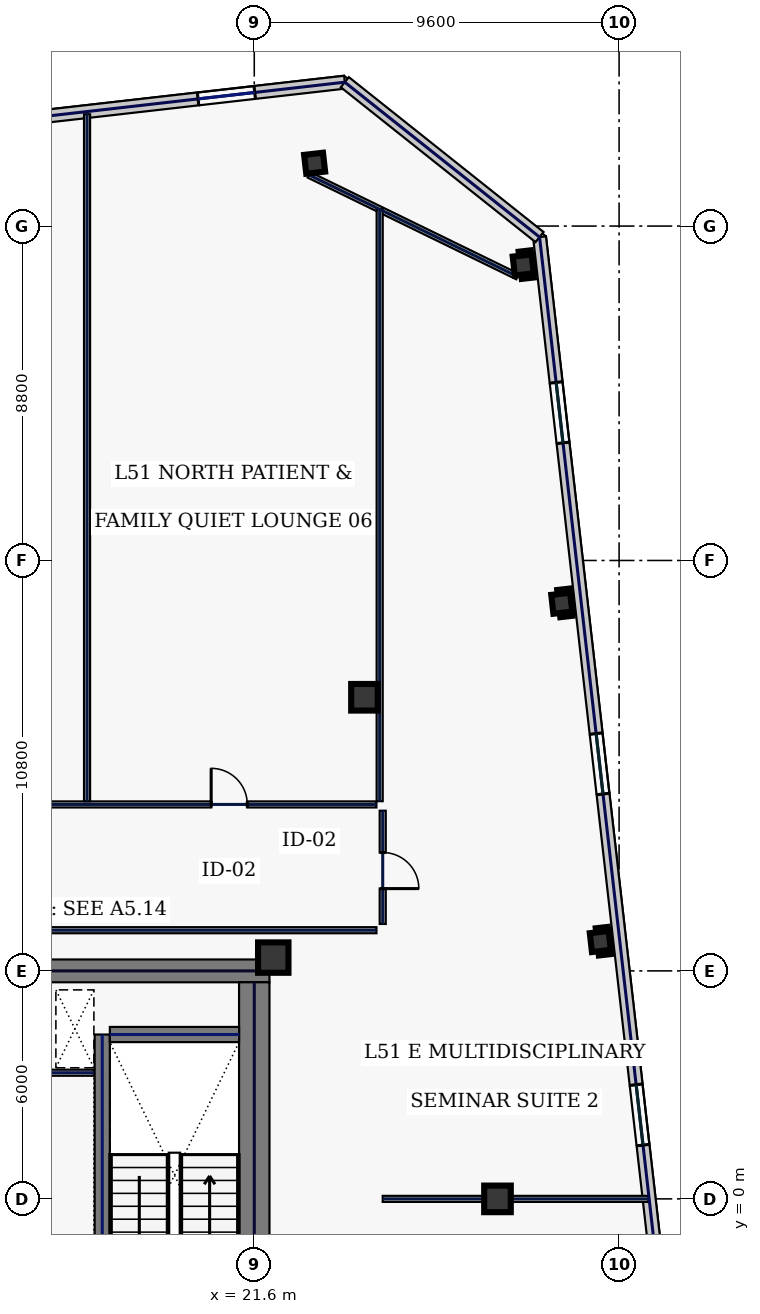
"""IFC4 building model, lengths in metres.
Left out: names, types, materials, properties, quantities, classifications, styles, units other than length and angle.
Written with IfcOpenShell. Run it as: python <this file> out.ifc"""

import sys

from ifc_helpers import new_model, si_unit, direction, frame, frame_2d, origin, origin_2d, place, context, subcontext, project, spatial, rectangle, hollow_rectangle, extrude, element, fill, save


model = new_model("IFC4")
c1 = context("Model", 3, precision=1e-05, world=origin(), true_north=direction((0.0, 1.0)))
c2 = subcontext(c1, "Body", "Model", "MODEL_VIEW")
j1 = project(units=[si_unit("LENGTHUNIT", "METRE"), si_unit("PLANEANGLEUNIT", "RADIAN")], contexts=[c1])
p1 = place(None, origin())
s1 = spatial("IfcSite", under=j1, at=p1, CompositionType="ELEMENT")
p2 = place(p1, origin())
s2 = spatial("IfcBuilding", under=s1, at=p2, CompositionType="ELEMENT")
p3 = place(p2, frame((0.0, 0.0, 222.2)))
s3 = spatial("IfcBuildingStorey", under=s2, at=p3, CompositionType="ELEMENT", Elevation=222.2)
p4 = place(p3, frame((10.5, 6.0, 0.0), z_axis=(0.0, 0.0, 1.0), x_axis=(1.0, 0.0, 0.0)))
e1 = element("IfcWall", 1, at=p4, inside=s3, PredefinedType="SHEAR", context=c2, shape_type="SweptSolid", body=[
    extrude(rectangle(XDim=11.5, YDim=0.6, at=frame_2d((5.75, 0.0))), origin(), (0.0, 0.0, 1.0), 3.74),
])
p5 = place(p3, frame((21.6, -5.7, 0.0), z_axis=(0.0, 0.0, 1.0), x_axis=(0.0, 1.0, 0.0)))
e2 = element("IfcWall", 2, at=p5, inside=s3, PredefinedType="SHEAR", context=c2, shape_type="SweptSolid", body=[
    extrude(rectangle(XDim=11.4, YDim=0.8, at=frame_2d((5.7, 0.0))), origin(), (0.0, 0.0, 1.0), 3.74),
])
p6 = place(p3, frame((17.6, -4.325, 0.0), z_axis=(0.0, 0.0, 1.0), x_axis=(0.0, 1.0, 0.0)))
e3 = element("IfcWall", 3, at=p6, inside=s3, PredefinedType="SHEAR", context=c2, shape_type="SweptSolid", body=[
    extrude(rectangle(XDim=8.65, YDim=0.4, at=frame_2d((4.325, 0.0))), origin(), (0.0, 0.0, 1.0), 3.74),
])
p7 = place(p6, frame((0.25, 0.0, 0.0)))
e4 = element("IfcOpeningElement", 4, at=p7, cuts=e3, PredefinedType="OPENING", context=c2, shape_type="SweptSolid", body=[
    extrude(rectangle(XDim=1.1, YDim=2.2, at=frame_2d((0.55, 1.1))), frame((0.0, 0.21, 0.0), z_axis=(0.0, -1.0, 0.0), x_axis=(1.0, 0.0, 0.0)), (0.0, 0.0, 1.0), 0.42),
])
p8 = place(p3, frame((17.8, 4.325, 0.0), z_axis=(0.0, 0.0, 1.0), x_axis=(1.0, 0.0, 0.0)))
e5 = element("IfcWall", 5, at=p8, inside=s3, PredefinedType="SHEAR", context=c2, shape_type="SweptSolid", body=[
    extrude(rectangle(XDim=3.4, YDim=0.4, at=frame_2d((1.7, 0.0))), origin(), (0.0, 0.0, 1.0), 3.74),
])
p9 = place(p3, frame((22.1, 6.35, 0.0), z_axis=(0.0, 0.0, 1.0), x_axis=(1.0, 0.0, 0.0)))
e6 = element("IfcColumn", 6, at=p9, inside=s3, PredefinedType="COLUMN", context=c2, shape_type="SweptSolid", body=[
    extrude(hollow_rectangle(XDim=0.8, YDim=0.8, WallThickness=0.036, at=origin_2d()), origin(), (0.0, 0.0, 1.0), 3.74),
])
for number, where, z_axis, x_axis in (
    (7, (24.5, 13.2, 0.0), (0.0, 0.0, 1.0), (1.0, 0.0, 0.0)),
    (8, (28.0, 0.0, 0.0), (0.0, 0.0, 1.0), (1.0, 0.0, 0.0)),
):
    element("IfcColumn", number, at=place(p3, frame(where, z_axis=z_axis, x_axis=x_axis)), inside=s3, PredefinedType="COLUMN", context=c2, shape_type="SweptSolid", body=[
        extrude(hollow_rectangle(XDim=0.7, YDim=0.7, WallThickness=0.032, at=origin_2d()), origin(), (0.0, 0.0, 1.0), 3.74),
    ])
for number, where, z_axis, x_axis in (
    (9, (23.188, 27.253, 0.0), (0.0, 0.0, 1.0), (0.994, 0.113, 0.0)),
    (10, (30.706, 6.772, 0.0), (0.0, 0.0, 1.0), (0.994, 0.113, 0.0)),
    (11, (29.691, 15.674, 0.0), (0.0, 0.0, 1.0), (0.994, 0.113, 0.0)),
    (12, (28.677, 24.577, 0.0), (0.0, 0.0, 1.0), (0.994, 0.113, 0.0)),
):
    element("IfcColumn", number, at=place(p3, frame(where, z_axis=z_axis, x_axis=x_axis)), inside=s3, PredefinedType="COLUMN", context=c2, shape_type="SweptSolid", body=[
        extrude(hollow_rectangle(XDim=0.5, YDim=0.5, WallThickness=0.025, at=origin_2d()), origin(), (0.0, 0.0, 1.0), 3.74),
    ])
p10 = place(p3, frame((23.983, 29.386, 0.0), z_axis=(0.0, 0.0, 1.0), x_axis=(-0.993572271362, -0.113199565282, 0.0)))
e13 = element("IfcWall", 13, at=p10, inside=s3, PredefinedType="STANDARD", context=c2, shape_type="SweptSolid", body=[
    extrude(rectangle(XDim=18.651, YDim=0.34, at=frame_2d((9.326, 0.0))), origin(), (0.0, 0.0, 1.0), 3.74),
])
p11 = place(p10, frame((14.027, 0.0, 0.83)))
e14 = element("IfcOpeningElement", 14, at=p11, cuts=e13, PredefinedType="OPENING", context=c2, shape_type="SweptSolid", body=[
    extrude(rectangle(XDim=1.5, YDim=2.0, at=frame_2d((0.75, 1.0))), frame((0.0, 0.18, 0.0), z_axis=(0.0, -1.0, 0.0), x_axis=(1.0, 0.0, 0.0)), (0.0, 0.0, 1.0), 0.36),
])
p12 = place(p10, frame((2.386, 0.0, 0.83)))
e15 = element("IfcOpeningElement", 15, at=p12, cuts=e13, PredefinedType="OPENING", context=c2, shape_type="SweptSolid", body=[
    extrude(rectangle(XDim=1.5, YDim=2.0, at=frame_2d((0.75, 1.0))), frame((0.0, 0.18, 0.0), z_axis=(0.0, -1.0, 0.0), x_axis=(1.0, 0.0, 0.0)), (0.0, 0.0, 1.0), 0.36),
])
p13 = place(p3, frame((33.318, -11.651, 0.0), z_axis=(0.0, 0.0, 1.0), x_axis=(-0.11320360501, 0.9935718111, 0.0)))
e16 = element("IfcWall", 16, at=p13, inside=s3, PredefinedType="STANDARD", context=c2, shape_type="SweptSolid", body=[
    extrude(rectangle(XDim=37.2, YDim=0.34, at=frame_2d((18.6, 0.0))), origin(), (0.0, 0.0, 1.0), 3.74),
])
p14 = place(p13, frame((3.85, 0.0, 0.58)))
e17 = element("IfcOpeningElement", 17, at=p14, cuts=e16, PredefinedType="OPENING", context=c2, shape_type="SweptSolid", body=[
    extrude(rectangle(XDim=1.6, YDim=2.3, at=frame_2d((0.8, 1.15))), frame((0.0, 0.18, 0.0), z_axis=(0.0, -1.0, 0.0), x_axis=(1.0, 0.0, 0.0)), (0.0, 0.0, 1.0), 0.36),
])
p15 = place(p13, frame((13.15, 0.0, 0.58)))
e18 = element("IfcOpeningElement", 18, at=p15, cuts=e16, PredefinedType="OPENING", context=c2, shape_type="SweptSolid", body=[
    extrude(rectangle(XDim=1.6, YDim=2.3, at=frame_2d((0.8, 1.15))), frame((0.0, 0.18, 0.0), z_axis=(0.0, -1.0, 0.0), x_axis=(1.0, 0.0, 0.0)), (0.0, 0.0, 1.0), 0.36),
])
p16 = place(p13, frame((22.45, 0.0, 0.58)))
e19 = element("IfcOpeningElement", 19, at=p16, cuts=e16, PredefinedType="OPENING", context=c2, shape_type="SweptSolid", body=[
    extrude(rectangle(XDim=1.6, YDim=2.3, at=frame_2d((0.8, 1.15))), frame((0.0, 0.18, 0.0), z_axis=(0.0, -1.0, 0.0), x_axis=(1.0, 0.0, 0.0)), (0.0, 0.0, 1.0), 0.36),
])
p17 = place(p13, frame((31.75, 0.0, 0.58)))
e20 = element("IfcOpeningElement", 20, at=p17, cuts=e16, PredefinedType="OPENING", context=c2, shape_type="SweptSolid", body=[
    extrude(rectangle(XDim=1.6, YDim=2.3, at=frame_2d((0.8, 1.15))), frame((0.0, 0.18, 0.0), z_axis=(0.0, -1.0, 0.0), x_axis=(1.0, 0.0, 0.0)), (0.0, 0.0, 1.0), 0.36),
])
p18 = place(p3, frame((29.107, 25.31, 0.0), z_axis=(0.0, 0.0, 1.0), x_axis=(-0.78259733853, 0.62252823689, 0.0)))
e21 = element("IfcWall", 21, at=p18, inside=s3, PredefinedType="STANDARD", context=c2, shape_type="SweptSolid", body=[
    extrude(rectangle(XDim=6.548, YDim=0.34, at=frame_2d((3.274, 0.0))), origin(), (0.0, 0.0, 1.0), 3.74),
])
p19 = place(p3, frame((15.725, 3.32, 0.0), z_axis=(0.0, 0.0, 1.0), x_axis=(1.0, 0.0, 0.0)))
e22 = element("IfcWall", 22, at=p19, inside=s3, PredefinedType="PARTITIONING", context=c2, shape_type="SweptSolid", body=[
    extrude(rectangle(XDim=1.655, YDim=0.16, at=frame_2d((0.827, 0.0))), origin(), (0.0, 0.0, 1.0), 3.74),
])
p20 = place(p3, frame((28.528, 24.271, 0.0), z_axis=(0.0, 0.0, 1.0), x_axis=(-0.898820692789, 0.438316509173, 0.0)))
e23 = element("IfcWall", 23, at=p20, inside=s3, PredefinedType="PARTITIONING", context=c2, shape_type="SweptSolid", body=[
    extrude(rectangle(XDim=6.107, YDim=0.16, at=frame_2d((3.053, 0.0))), origin(), (0.0, 0.0, 1.0), 3.74),
])
p21 = place(p3, frame((-24.815, 10.38, 0.0), z_axis=(0.0, 0.0, 1.0), x_axis=(1.0, 0.0, 0.0)))
e24 = element("IfcWall", 24, at=p21, inside=s3, PredefinedType="PARTITIONING", context=c2, shape_type="SweptSolid", body=[
    extrude(rectangle(XDim=49.63, YDim=0.16, at=frame_2d((24.815, 0.0))), origin(), (0.0, 0.0, 1.0), 3.74),
])
p22 = place(p21, frame((2.044, 0.0, 0.0)))
e25 = element("IfcOpeningElement", 25, at=p22, cuts=e24, PredefinedType="OPENING", context=c2, shape_type="SweptSolid", body=[
    extrude(rectangle(XDim=0.95, YDim=2.2, at=frame_2d((0.475, 1.1))), frame((0.0, 0.09, 0.0), z_axis=(0.0, -1.0, 0.0), x_axis=(1.0, 0.0, 0.0)), (0.0, 0.0, 1.0), 0.18),
])
p23 = place(p21, frame((6.72, 0.0, 0.0)))
e26 = element("IfcOpeningElement", 26, at=p23, cuts=e24, PredefinedType="OPENING", context=c2, shape_type="SweptSolid", body=[
    extrude(rectangle(XDim=0.95, YDim=2.2, at=frame_2d((0.475, 1.1))), frame((0.0, 0.09, 0.0), z_axis=(0.0, -1.0, 0.0), x_axis=(1.0, 0.0, 0.0)), (0.0, 0.0, 1.0), 0.18),
])
p24 = place(p21, frame((12.13, 0.0, 0.0)))
e27 = element("IfcOpeningElement", 27, at=p24, cuts=e24, PredefinedType="OPENING", context=c2, shape_type="SweptSolid", body=[
    extrude(rectangle(XDim=0.95, YDim=2.2, at=frame_2d((0.475, 1.1))), frame((0.0, 0.09, 0.0), z_axis=(0.0, -1.0, 0.0), x_axis=(1.0, 0.0, 0.0)), (0.0, 0.0, 1.0), 0.18),
])
p25 = place(p21, frame((17.235, 0.0, 0.0)))
e28 = element("IfcOpeningElement", 28, at=p25, cuts=e24, PredefinedType="OPENING", context=c2, shape_type="SweptSolid", body=[
    extrude(rectangle(XDim=1.3, YDim=2.2, at=frame_2d((0.65, 1.1))), frame((0.0, 0.09, 0.0), z_axis=(0.0, -1.0, 0.0), x_axis=(1.0, 0.0, 0.0)), (0.0, 0.0, 1.0), 0.18),
])
p26 = place(p21, frame((22.89, 0.0, 0.0)))
e29 = element("IfcOpeningElement", 29, at=p26, cuts=e24, PredefinedType="OPENING", context=c2, shape_type="SweptSolid", body=[
    extrude(rectangle(XDim=1.3, YDim=2.2, at=frame_2d((0.65, 1.1))), frame((0.0, 0.09, 0.0), z_axis=(0.0, -1.0, 0.0), x_axis=(1.0, 0.0, 0.0)), (0.0, 0.0, 1.0), 0.18),
])
p27 = place(p21, frame((27.925, 0.0, 0.0)))
e30 = element("IfcOpeningElement", 30, at=p27, cuts=e24, PredefinedType="OPENING", context=c2, shape_type="SweptSolid", body=[
    extrude(rectangle(XDim=0.95, YDim=2.2, at=frame_2d((0.475, 1.1))), frame((0.0, 0.09, 0.0), z_axis=(0.0, -1.0, 0.0), x_axis=(1.0, 0.0, 0.0)), (0.0, 0.0, 1.0), 0.18),
])
p28 = place(p21, frame((34.445, 0.0, 0.0)))
e31 = element("IfcOpeningElement", 31, at=p28, cuts=e24, PredefinedType="OPENING", context=c2, shape_type="SweptSolid", body=[
    extrude(rectangle(XDim=0.95, YDim=2.2, at=frame_2d((0.475, 1.1))), frame((0.0, 0.09, 0.0), z_axis=(0.0, -1.0, 0.0), x_axis=(1.0, 0.0, 0.0)), (0.0, 0.0, 1.0), 0.18),
])
p29 = place(p21, frame((39.645, 0.0, 0.0)))
e32 = element("IfcOpeningElement", 32, at=p29, cuts=e24, PredefinedType="OPENING", context=c2, shape_type="SweptSolid", body=[
    extrude(rectangle(XDim=0.95, YDim=2.2, at=frame_2d((0.475, 1.1))), frame((0.0, 0.09, 0.0), z_axis=(0.0, -1.0, 0.0), x_axis=(1.0, 0.0, 0.0)), (0.0, 0.0, 1.0), 0.18),
])
p30 = place(p21, frame((45.281, 0.0, 0.0)))
e33 = element("IfcOpeningElement", 33, at=p30, cuts=e24, PredefinedType="OPENING", context=c2, shape_type="SweptSolid", body=[
    extrude(rectangle(XDim=0.95, YDim=2.2, at=frame_2d((0.475, 1.1))), frame((0.0, 0.09, 0.0), z_axis=(0.0, -1.0, 0.0), x_axis=(1.0, 0.0, 0.0)), (0.0, 0.0, 1.0), 0.18),
])
p31 = place(p3, frame((24.98, 10.215, 0.0), z_axis=(0.0, 0.0, 1.0), x_axis=(0.0, -1.0, 0.0)))
e34 = element("IfcWall", 34, at=p31, inside=s3, PredefinedType="PARTITIONING", context=c2, shape_type="SweptSolid", body=[
    extrude(rectangle(XDim=2.98, YDim=0.16, at=frame_2d((1.49, 0.0))), origin(), (0.0, 0.0, 1.0), 3.74),
])
p32 = place(p31, frame((1.1, 0.0, 0.0)))
e35 = element("IfcOpeningElement", 35, at=p32, cuts=e34, PredefinedType="OPENING", context=c2, shape_type="SweptSolid", body=[
    extrude(rectangle(XDim=0.95, YDim=2.2, at=frame_2d((0.475, 1.1))), frame((0.0, 0.09, 0.0), z_axis=(0.0, -1.0, 0.0), x_axis=(1.0, 0.0, 0.0)), (0.0, 0.0, 1.0), 0.18),
])
p33 = place(p3, frame((24.815, 7.07, 0.0), z_axis=(0.0, 0.0, 1.0), x_axis=(-1.0, 0.0, 0.0)))
e36 = element("IfcWall", 36, at=p33, inside=s3, PredefinedType="PARTITIONING", context=c2, shape_type="SweptSolid", body=[
    extrude(rectangle(XDim=14.1, YDim=0.16, at=frame_2d((7.05, 0.0))), origin(), (0.0, 0.0, 1.0), 3.74),
])
p34 = place(p3, frame((24.9, 10.465, 0.0), z_axis=(0.0, 0.0, 1.0), x_axis=(0.0, 1.0, 0.0)))
e37 = element("IfcWall", 37, at=p34, inside=s3, PredefinedType="PARTITIONING", context=c2, shape_type="SweptSolid", body=[
    extrude(rectangle(XDim=15.579, YDim=0.16, at=frame_2d((7.79, 0.0))), origin(), (0.0, 0.0, 1.0), 3.74),
])
p35 = place(p3, frame((17.2, 10.465, 0.0), z_axis=(0.0, 0.0, 1.0), x_axis=(0.0, 1.0, 0.0)))
e38 = element("IfcWall", 38, at=p35, inside=s3, PredefinedType="PARTITIONING", context=c2, shape_type="SweptSolid", body=[
    extrude(rectangle(XDim=18.078, YDim=0.16, at=frame_2d((9.039, 0.0))), origin(), (0.0, 0.0, 1.0), 3.74),
])
p36 = place(p3, frame((24.98, 0.0, 0.0), z_axis=(0.0, 0.0, 1.0), x_axis=(1.0, 0.0, 0.0)))
e39 = element("IfcWall", 39, at=p36, inside=s3, PredefinedType="PARTITIONING", context=c2, shape_type="SweptSolid", body=[
    extrude(rectangle(XDim=6.99, YDim=0.16, at=frame_2d((3.495, 0.0))), origin(), (0.0, 0.0, 1.0), 3.74),
])
p37 = place(p12, origin())
e40 = element("IfcWindow", 40, at=p37, inside=s3, PartitioningType="SINGLE_PANEL", PredefinedType="WINDOW", context=c2, shape_type="SweptSolid", body=[
    extrude(rectangle(XDim=1.5, YDim=2.0, at=frame_2d((0.75, 1.0))), frame((0.0, 0.03, 0.0), z_axis=(0.0, -1.0, 0.0), x_axis=(1.0, 0.0, 0.0)), (0.0, 0.0, 1.0), 0.06),
])
fill(e15, e40)
p38 = place(p15, origin())
e41 = element("IfcWindow", 41, at=p38, inside=s3, PartitioningType="SINGLE_PANEL", PredefinedType="WINDOW", context=c2, shape_type="SweptSolid", body=[
    extrude(rectangle(XDim=1.6, YDim=2.3, at=frame_2d((0.8, 1.15))), frame((0.0, 0.03, 0.0), z_axis=(0.0, -1.0, 0.0), x_axis=(1.0, 0.0, 0.0)), (0.0, 0.0, 1.0), 0.06),
])
fill(e18, e41)
p39 = place(p16, origin())
e42 = element("IfcWindow", 42, at=p39, inside=s3, PartitioningType="SINGLE_PANEL", PredefinedType="WINDOW", context=c2, shape_type="SweptSolid", body=[
    extrude(rectangle(XDim=1.6, YDim=2.3, at=frame_2d((0.8, 1.15))), frame((0.0, 0.03, 0.0), z_axis=(0.0, -1.0, 0.0), x_axis=(1.0, 0.0, 0.0)), (0.0, 0.0, 1.0), 0.06),
])
fill(e19, e42)
p40 = place(p17, origin())
e43 = element("IfcWindow", 43, at=p40, inside=s3, PartitioningType="SINGLE_PANEL", PredefinedType="WINDOW", context=c2, shape_type="SweptSolid", body=[
    extrude(rectangle(XDim=1.6, YDim=2.3, at=frame_2d((0.8, 1.15))), frame((0.0, 0.03, 0.0), z_axis=(0.0, -1.0, 0.0), x_axis=(1.0, 0.0, 0.0)), (0.0, 0.0, 1.0), 0.06),
])
fill(e20, e43)
p41 = place(p30, origin())
e44 = element("IfcDoor", 44, at=p41, inside=s3, OperationType="SINGLE_SWING_LEFT", PredefinedType="DOOR", context=c2, shape_type="SweptSolid", body=[
    extrude(rectangle(XDim=0.95, YDim=2.2, at=frame_2d((0.475, 1.1))), frame((0.0, 0.025, 0.0), z_axis=(0.0, -1.0, 0.0), x_axis=(1.0, 0.0, 0.0)), (0.0, 0.0, 1.0), 0.05),
])
fill(e33, e44)
p42 = place(p32, origin())
e45 = element("IfcDoor", 45, at=p42, inside=s3, OperationType="SINGLE_SWING_RIGHT", PredefinedType="DOOR", context=c2, shape_type="SweptSolid", body=[
    extrude(rectangle(XDim=0.95, YDim=2.2, at=frame_2d((0.475, 1.1))), frame((0.0, 0.025, 0.0), z_axis=(0.0, -1.0, 0.0), x_axis=(1.0, 0.0, 0.0)), (0.0, 0.0, 1.0), 0.05),
])
fill(e35, e45)
save(model, sys.argv[1])
